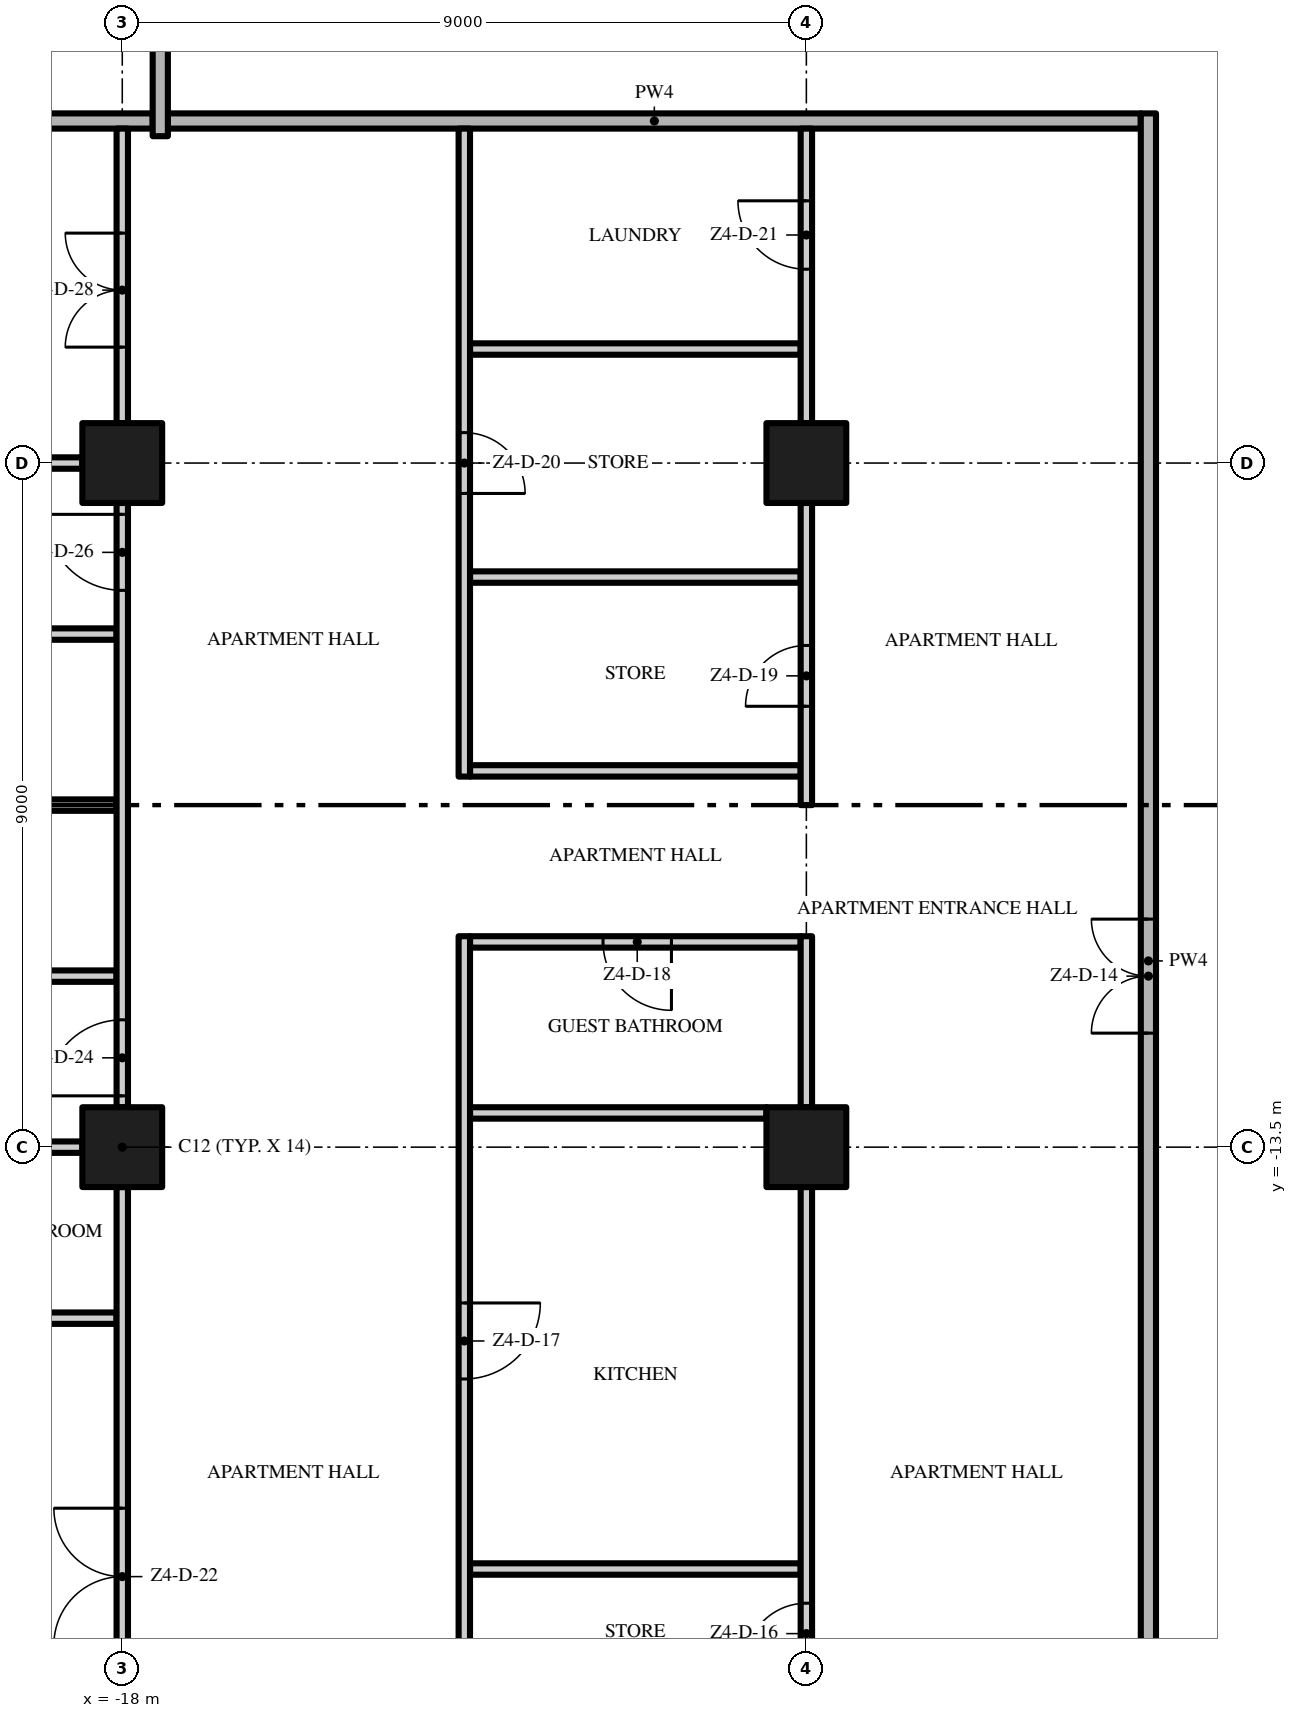
"""IFC4 building model, lengths in metres.
Left out: names, types, materials, properties, quantities, classifications, styles, units other than length and angle.
Written with IfcOpenShell. Run it as: python <this file> out.ifc"""

import sys

from ifc_helpers import new_model, si_unit, direction, frame, frame_2d, origin, origin_2d, place, context, subcontext, project, spatial, rectangle, extrude, element, fill, save


model = new_model("IFC4")
c1 = context("Model", 3, precision=1e-05, world=origin(), true_north=direction((0.0, 1.0)))
c2 = subcontext(c1, "Body", "Model", "MODEL_VIEW")
j1 = project(units=[si_unit("LENGTHUNIT", "METRE"), si_unit("PLANEANGLEUNIT", "RADIAN")], contexts=[c1])
p1 = place(None, origin())
s1 = spatial("IfcSite", under=j1, at=p1, CompositionType="ELEMENT")
p2 = place(p1, origin())
s2 = spatial("IfcBuilding", under=s1, at=p2, CompositionType="ELEMENT")
p3 = place(p2, frame((0.0, 0.0, 218.6)))
s3 = spatial("IfcBuildingStorey", under=s2, at=p3, CompositionType="ELEMENT", Elevation=218.6)
for number, where, z_axis, x_axis in (
    (1, (-18.0, -13.5, 0.0), (0.0, 0.0, 1.0), (1.0, 0.0, 0.0)),
    (2, (-18.0, -4.5, 0.0), (0.0, 0.0, 1.0), (1.0, 0.0, 0.0)),
    (3, (-9.0, -13.5, 0.0), (0.0, 0.0, 1.0), (1.0, 0.0, 0.0)),
    (4, (-9.0, -4.5, 0.0), (0.0, 0.0, 1.0), (1.0, 0.0, 0.0)),
):
    element("IfcColumn", number, at=place(p3, frame(where, z_axis=z_axis, x_axis=x_axis)), inside=s3, PredefinedType="COLUMN", context=c2, shape_type="SweptSolid", body=[
        extrude(rectangle(XDim=1.05, YDim=1.05, at=origin_2d()), origin(), (0.0, 0.0, 1.0), 3.5),
    ])
p4 = place(p3, frame((-13.425, -19.05, 0.0), z_axis=(0.0, 0.0, 1.0), x_axis=(1.0, 0.0, 0.0)))
e5 = element("IfcWall", 5, at=p4, inside=s3, PredefinedType="PARTITIONING", context=c2, shape_type="SweptSolid", body=[
    extrude(rectangle(XDim=4.35, YDim=0.15, at=frame_2d((2.175, 0.0))), origin(), (0.0, 0.0, 1.0), 3.5),
])
p5 = place(p3, frame((-20.925, -15.75, 0.0), z_axis=(0.0, 0.0, 1.0), x_axis=(1.0, 0.0, 0.0)))
e6 = element("IfcWall", 6, at=p5, inside=s3, PredefinedType="PARTITIONING", context=c2, shape_type="SweptSolid", body=[
    extrude(rectangle(XDim=2.85, YDim=0.15, at=frame_2d((1.425, 0.0))), origin(), (0.0, 0.0, 1.0), 3.5),
])
p6 = place(p3, frame((-26.05, -13.5, 0.0), z_axis=(0.0, 0.0, 1.0), x_axis=(1.0, 0.0, 0.0)))
e7 = element("IfcWall", 7, at=p6, inside=s3, PredefinedType="PARTITIONING", context=c2, shape_type="SweptSolid", body=[
    extrude(rectangle(XDim=7.525, YDim=0.15, at=frame_2d((3.763, 0.0))), origin(), (0.0, 0.0, 1.0), 3.5),
])
p7 = place(p3, frame((-13.425, -13.05, 0.0), z_axis=(0.0, 0.0, 1.0), x_axis=(1.0, 0.0, 0.0)))
e8 = element("IfcWall", 8, at=p7, inside=s3, PredefinedType="PARTITIONING", context=c2, shape_type="SweptSolid", body=[
    extrude(rectangle(XDim=3.9, YDim=0.15, at=frame_2d((1.95, 0.0))), origin(), (0.0, 0.0, 1.0), 3.5),
])
p8 = place(p3, frame((-20.925, -11.25, 0.0), z_axis=(0.0, 0.0, 1.0), x_axis=(1.0, 0.0, 0.0)))
e9 = element("IfcWall", 9, at=p8, inside=s3, PredefinedType="PARTITIONING", context=c2, shape_type="SweptSolid", body=[
    extrude(rectangle(XDim=2.85, YDim=0.15, at=frame_2d((1.425, 0.0))), origin(), (0.0, 0.0, 1.0), 3.5),
])
p9 = place(p3, frame((-9.075, -10.8, 0.0), z_axis=(0.0, 0.0, 1.0), x_axis=(-1.0, 0.0, 0.0)))
e10 = element("IfcWall", 10, at=p9, inside=s3, PredefinedType="PARTITIONING", context=c2, shape_type="SweptSolid", body=[
    extrude(rectangle(XDim=4.35, YDim=0.15, at=frame_2d((2.175, 0.0))), origin(), (0.0, 0.0, 1.0), 3.5),
])
p10 = place(p9, frame((1.7, 0.0, 0.0)))
e11 = element("IfcOpeningElement", 11, at=p10, cuts=e10, PredefinedType="OPENING", context=c2, shape_type="SweptSolid", body=[
    extrude(rectangle(XDim=0.9, YDim=2.1, at=frame_2d((0.45, 1.05))), frame((0.0, 0.085, 0.0), z_axis=(0.0, -1.0, 0.0), x_axis=(1.0, 0.0, 0.0)), (0.0, 0.0, 1.0), 0.17),
])
p11 = place(p3, frame((-20.925, -9.0, 0.0), z_axis=(0.0, 0.0, 1.0), x_axis=(1.0, 0.0, 0.0)))
e12 = element("IfcWall", 12, at=p11, inside=s3, PredefinedType="PARTITIONING", context=c2, shape_type="SweptSolid", body=[
    extrude(rectangle(XDim=2.85, YDim=0.15, at=frame_2d((1.425, 0.0))), origin(), (0.0, 0.0, 1.0), 3.5),
])
p12 = place(p3, frame((-13.425, -8.55, 0.0), z_axis=(0.0, 0.0, 1.0), x_axis=(1.0, 0.0, 0.0)))
e13 = element("IfcWall", 13, at=p12, inside=s3, PredefinedType="PARTITIONING", context=c2, shape_type="SweptSolid", body=[
    extrude(rectangle(XDim=4.35, YDim=0.15, at=frame_2d((2.175, 0.0))), origin(), (0.0, 0.0, 1.0), 3.5),
])
p13 = place(p3, frame((-20.925, -6.75, 0.0), z_axis=(0.0, 0.0, 1.0), x_axis=(1.0, 0.0, 0.0)))
e14 = element("IfcWall", 14, at=p13, inside=s3, PredefinedType="PARTITIONING", context=c2, shape_type="SweptSolid", body=[
    extrude(rectangle(XDim=2.85, YDim=0.15, at=frame_2d((1.425, 0.0))), origin(), (0.0, 0.0, 1.0), 3.5),
])
p14 = place(p3, frame((-13.425, -6.0, 0.0), z_axis=(0.0, 0.0, 1.0), x_axis=(1.0, 0.0, 0.0)))
e15 = element("IfcWall", 15, at=p14, inside=s3, PredefinedType="PARTITIONING", context=c2, shape_type="SweptSolid", body=[
    extrude(rectangle(XDim=4.35, YDim=0.15, at=frame_2d((2.175, 0.0))), origin(), (0.0, 0.0, 1.0), 3.5),
])
p15 = place(p3, frame((-26.05, -4.5, 0.0), z_axis=(0.0, 0.0, 1.0), x_axis=(1.0, 0.0, 0.0)))
e16 = element("IfcWall", 16, at=p15, inside=s3, PredefinedType="PARTITIONING", context=c2, shape_type="SweptSolid", body=[
    extrude(rectangle(XDim=7.525, YDim=0.15, at=frame_2d((3.763, 0.0))), origin(), (0.0, 0.0, 1.0), 3.5),
])
p16 = place(p3, frame((-13.425, -3.0, 0.0), z_axis=(0.0, 0.0, 1.0), x_axis=(1.0, 0.0, 0.0)))
e17 = element("IfcWall", 17, at=p16, inside=s3, PredefinedType="PARTITIONING", context=c2, shape_type="SweptSolid", body=[
    extrude(rectangle(XDim=4.35, YDim=0.15, at=frame_2d((2.175, 0.0))), origin(), (0.0, 0.0, 1.0), 3.5),
])
p17 = place(p3, frame((-17.4, 0.0, 0.0), z_axis=(0.0, 0.0, 1.0), x_axis=(1.0, 0.0, 0.0)))
e18 = element("IfcWall", 18, at=p17, inside=s3, PredefinedType="PARTITIONING", context=c2, shape_type="SweptSolid", body=[
    extrude(rectangle(XDim=12.8, YDim=0.2, at=frame_2d((6.4, 0.0))), origin(), (0.0, 0.0, 1.0), 3.5),
])
p18 = place(p3, frame((-26.7, 0.0, 0.0), z_axis=(0.0, 0.0, 1.0), x_axis=(1.0, 0.0, 0.0)))
e19 = element("IfcWall", 19, at=p18, inside=s3, PredefinedType="PARTITIONING", context=c2, shape_type="SweptSolid", body=[
    extrude(rectangle(XDim=9.1, YDim=0.2, at=frame_2d((4.55, 0.0))), origin(), (0.0, 0.0, 1.0), 3.5),
])
p19 = place(p3, frame((-18.0, -21.55, 0.0), z_axis=(0.0, 0.0, 1.0), x_axis=(0.0, 1.0, 0.0)))
e20 = element("IfcWall", 20, at=p19, inside=s3, PredefinedType="PARTITIONING", context=c2, shape_type="SweptSolid", body=[
    extrude(rectangle(XDim=7.525, YDim=0.15, at=frame_2d((3.763, 0.0))), origin(), (0.0, 0.0, 1.0), 3.5),
])
p20 = place(p19, frame((1.5, 0.0, 0.0)))
e21 = element("IfcOpeningElement", 21, at=p20, cuts=e20, PredefinedType="OPENING", context=c2, shape_type="SweptSolid", body=[
    extrude(rectangle(XDim=1.8, YDim=2.4, at=frame_2d((0.9, 1.2))), frame((0.0, 0.085, 0.0), z_axis=(0.0, -1.0, 0.0), x_axis=(1.0, 0.0, 0.0)), (0.0, 0.0, 1.0), 0.17),
])
p21 = place(p3, frame((-18.0, -12.975, 0.0), z_axis=(0.0, 0.0, 1.0), x_axis=(0.0, 1.0, 0.0)))
e22 = element("IfcWall", 22, at=p21, inside=s3, PredefinedType="PARTITIONING", context=c2, shape_type="SweptSolid", body=[
    extrude(rectangle(XDim=7.95, YDim=0.15, at=frame_2d((3.975, 0.0))), origin(), (0.0, 0.0, 1.0), 3.5),
])
p22 = place(p21, frame((0.15, 0.0, 0.0)))
e23 = element("IfcOpeningElement", 23, at=p22, cuts=e22, PredefinedType="OPENING", context=c2, shape_type="SweptSolid", body=[
    extrude(rectangle(XDim=1.0, YDim=2.4, at=frame_2d((0.5, 1.2))), frame((0.0, 0.085, 0.0), z_axis=(0.0, -1.0, 0.0), x_axis=(1.0, 0.0, 0.0)), (0.0, 0.0, 1.0), 0.17),
])
p23 = place(p21, frame((6.8, 0.0, 0.0)))
e24 = element("IfcOpeningElement", 24, at=p23, cuts=e22, PredefinedType="OPENING", context=c2, shape_type="SweptSolid", body=[
    extrude(rectangle(XDim=1.0, YDim=2.4, at=frame_2d((0.5, 1.2))), frame((0.0, 0.085, 0.0), z_axis=(0.0, -1.0, 0.0), x_axis=(1.0, 0.0, 0.0)), (0.0, 0.0, 1.0), 0.17),
])
p24 = place(p3, frame((-18.0, -3.975, 0.0), z_axis=(0.0, 0.0, 1.0), x_axis=(0.0, 1.0, 0.0)))
e25 = element("IfcWall", 25, at=p24, inside=s3, PredefinedType="PARTITIONING", context=c2, shape_type="SweptSolid", body=[
    extrude(rectangle(XDim=3.875, YDim=0.15, at=frame_2d((1.938, 0.0))), origin(), (0.0, 0.0, 1.0), 3.5),
])
p25 = place(p24, frame((1.0, 0.0, 0.0)))
e26 = element("IfcOpeningElement", 26, at=p25, cuts=e25, PredefinedType="OPENING", context=c2, shape_type="SweptSolid", body=[
    extrude(rectangle(XDim=1.5, YDim=2.4, at=frame_2d((0.75, 1.2))), frame((0.0, 0.085, 0.0), z_axis=(0.0, -1.0, 0.0), x_axis=(1.0, 0.0, 0.0)), (0.0, 0.0, 1.0), 0.17),
])
p26 = place(p3, frame((-17.5, -0.2, 0.0), z_axis=(0.0, 0.0, 1.0), x_axis=(0.0, 1.0, 0.0)))
e27 = element("IfcWall", 27, at=p26, inside=s3, PredefinedType="PARTITIONING", context=c2, shape_type="SweptSolid", body=[
    extrude(rectangle(XDim=4.175, YDim=0.2, at=frame_2d((2.087, 0.0))), origin(), (0.0, 0.0, 1.0), 3.5),
])
p27 = place(p3, frame((-13.5, -10.725, 0.0), z_axis=(0.0, 0.0, 1.0), x_axis=(0.0, -1.0, 0.0)))
e28 = element("IfcWall", 28, at=p27, inside=s3, PredefinedType="PARTITIONING", context=c2, shape_type="SweptSolid", body=[
    extrude(rectangle(XDim=11.475, YDim=0.15, at=frame_2d((5.737, 0.0))), origin(), (0.0, 0.0, 1.0), 3.5),
])
p28 = place(p27, frame((10.475, 0.0, 0.0)))
e29 = element("IfcOpeningElement", 29, at=p28, cuts=e28, PredefinedType="OPENING", context=c2, shape_type="SweptSolid", body=[
    extrude(rectangle(XDim=0.8, YDim=2.0, at=frame_2d((0.4, 1.0))), frame((0.0, 0.085, 0.0), z_axis=(0.0, -1.0, 0.0), x_axis=(1.0, 0.0, 0.0)), (0.0, 0.0, 1.0), 0.17),
])
p29 = place(p27, frame((4.825, 0.0, 0.0)))
e30 = element("IfcOpeningElement", 30, at=p29, cuts=e28, PredefinedType="OPENING", context=c2, shape_type="SweptSolid", body=[
    extrude(rectangle(XDim=1.0, YDim=2.4, at=frame_2d((0.5, 1.2))), frame((0.0, 0.085, 0.0), z_axis=(0.0, -1.0, 0.0), x_axis=(1.0, 0.0, 0.0)), (0.0, 0.0, 1.0), 0.17),
])
p30 = place(p3, frame((-13.5, -0.1, 0.0), z_axis=(0.0, 0.0, 1.0), x_axis=(0.0, -1.0, 0.0)))
e31 = element("IfcWall", 31, at=p30, inside=s3, PredefinedType="PARTITIONING", context=c2, shape_type="SweptSolid", body=[
    extrude(rectangle(XDim=8.525, YDim=0.15, at=frame_2d((4.263, 0.0))), origin(), (0.0, 0.0, 1.0), 3.5),
])
p31 = place(p30, frame((4.0, 0.0, 0.0)))
e32 = element("IfcOpeningElement", 32, at=p31, cuts=e31, PredefinedType="OPENING", context=c2, shape_type="SweptSolid", body=[
    extrude(rectangle(XDim=0.8, YDim=2.0, at=frame_2d((0.4, 1.0))), frame((0.0, 0.085, 0.0), z_axis=(0.0, -1.0, 0.0), x_axis=(1.0, 0.0, 0.0)), (0.0, 0.0, 1.0), 0.17),
])
p32 = place(p3, frame((-9.0, -21.55, 0.0), z_axis=(0.0, 0.0, 1.0), x_axis=(0.0, 1.0, 0.0)))
e33 = element("IfcWall", 33, at=p32, inside=s3, PredefinedType="PARTITIONING", context=c2, shape_type="SweptSolid", body=[
    extrude(rectangle(XDim=7.525, YDim=0.15, at=frame_2d((3.763, 0.0))), origin(), (0.0, 0.0, 1.0), 3.5),
])
p33 = place(p32, frame((1.25, 0.0, 0.0)))
e34 = element("IfcOpeningElement", 34, at=p33, cuts=e33, PredefinedType="OPENING", context=c2, shape_type="SweptSolid", body=[
    extrude(rectangle(XDim=0.8, YDim=2.0, at=frame_2d((0.4, 1.0))), frame((0.0, 0.085, 0.0), z_axis=(0.0, -1.0, 0.0), x_axis=(1.0, 0.0, 0.0)), (0.0, 0.0, 1.0), 0.17),
])
p34 = place(p3, frame((-9.0, -12.975, 0.0), z_axis=(0.0, 0.0, 1.0), x_axis=(0.0, 1.0, 0.0)))
e35 = element("IfcWall", 35, at=p34, inside=s3, PredefinedType="PARTITIONING", context=c2, shape_type="SweptSolid", body=[
    extrude(rectangle(XDim=2.25, YDim=0.15, at=frame_2d((1.125, 0.0))), origin(), (0.0, 0.0, 1.0), 3.5),
])
p35 = place(p3, frame((-9.0, -9.0, 0.0), z_axis=(0.0, 0.0, 1.0), x_axis=(0.0, 1.0, 0.0)))
e36 = element("IfcWall", 36, at=p35, inside=s3, PredefinedType="PARTITIONING", context=c2, shape_type="SweptSolid", body=[
    extrude(rectangle(XDim=3.975, YDim=0.15, at=frame_2d((1.988, 0.0))), origin(), (0.0, 0.0, 1.0), 3.5),
])
p36 = place(p35, frame((1.3, 0.0, 0.0)))
e37 = element("IfcOpeningElement", 37, at=p36, cuts=e36, PredefinedType="OPENING", context=c2, shape_type="SweptSolid", body=[
    extrude(rectangle(XDim=0.8, YDim=2.0, at=frame_2d((0.4, 1.0))), frame((0.0, 0.085, 0.0), z_axis=(0.0, -1.0, 0.0), x_axis=(1.0, 0.0, 0.0)), (0.0, 0.0, 1.0), 0.17),
])
p37 = place(p3, frame((-9.0, -3.975, 0.0), z_axis=(0.0, 0.0, 1.0), x_axis=(0.0, 1.0, 0.0)))
e38 = element("IfcWall", 38, at=p37, inside=s3, PredefinedType="PARTITIONING", context=c2, shape_type="SweptSolid", body=[
    extrude(rectangle(XDim=3.875, YDim=0.15, at=frame_2d((1.938, 0.0))), origin(), (0.0, 0.0, 1.0), 3.5),
])
p38 = place(p37, frame((2.025, 0.0, 0.0)))
e39 = element("IfcOpeningElement", 39, at=p38, cuts=e38, PredefinedType="OPENING", context=c2, shape_type="SweptSolid", body=[
    extrude(rectangle(XDim=0.9, YDim=2.1, at=frame_2d((0.45, 1.05))), frame((0.0, 0.085, 0.0), z_axis=(0.0, -1.0, 0.0), x_axis=(1.0, 0.0, 0.0)), (0.0, 0.0, 1.0), 0.17),
])
p39 = place(p3, frame((-4.5, -22.2, 0.0), z_axis=(0.0, 0.0, 1.0), x_axis=(0.0, 1.0, 0.0)))
e40 = element("IfcWall", 40, at=p39, inside=s3, PredefinedType="PARTITIONING", context=c2, shape_type="SweptSolid", body=[
    extrude(rectangle(XDim=22.3, YDim=0.2, at=frame_2d((11.15, 0.0))), origin(), (0.0, 0.0, 1.0), 3.5),
])
p40 = place(p39, frame((10.2, 0.0, 0.0)))
e41 = element("IfcOpeningElement", 41, at=p40, cuts=e40, PredefinedType="OPENING", context=c2, shape_type="SweptSolid", body=[
    extrude(rectangle(XDim=1.5, YDim=2.4, at=frame_2d((0.75, 1.2))), frame((0.0, 0.11, 0.0), z_axis=(0.0, -1.0, 0.0), x_axis=(1.0, 0.0, 0.0)), (0.0, 0.0, 1.0), 0.22),
])
p41 = place(p40, origin())
e42 = element("IfcDoor", 42, at=p41, inside=s3, OperationType="DOUBLE_DOOR_SINGLE_SWING", PredefinedType="DOOR", context=c2, shape_type="SweptSolid", body=[
    extrude(rectangle(XDim=1.5, YDim=2.4, at=frame_2d((0.75, 1.2))), frame((0.0, 0.025, 0.0), z_axis=(0.0, -1.0, 0.0), x_axis=(1.0, 0.0, 0.0)), (0.0, 0.0, 1.0), 0.05),
])
fill(e41, e42)
p42 = place(p33, origin())
e43 = element("IfcDoor", 43, at=p42, inside=s3, OperationType="SINGLE_SWING_LEFT", PredefinedType="DOOR", context=c2, shape_type="SweptSolid", body=[
    extrude(rectangle(XDim=0.8, YDim=2.0, at=frame_2d((0.4, 1.0))), frame((0.0, 0.025, 0.0), z_axis=(0.0, -1.0, 0.0), x_axis=(1.0, 0.0, 0.0)), (0.0, 0.0, 1.0), 0.05),
])
fill(e34, e43)
p43 = place(p29, origin())
e44 = element("IfcDoor", 44, at=p43, inside=s3, OperationType="SINGLE_SWING_LEFT", PredefinedType="DOOR", context=c2, shape_type="SweptSolid", body=[
    extrude(rectangle(XDim=1.0, YDim=2.4, at=frame_2d((0.5, 1.2))), frame((0.0, 0.025, 0.0), z_axis=(0.0, -1.0, 0.0), x_axis=(1.0, 0.0, 0.0)), (0.0, 0.0, 1.0), 0.05),
])
fill(e30, e44)
p44 = place(p10, origin())
e45 = element("IfcDoor", 45, at=p44, inside=s3, OperationType="SINGLE_SWING_LEFT", PredefinedType="DOOR", context=c2, shape_type="SweptSolid", body=[
    extrude(rectangle(XDim=0.9, YDim=2.1, at=frame_2d((0.45, 1.05))), frame((0.0, 0.025, 0.0), z_axis=(0.0, -1.0, 0.0), x_axis=(1.0, 0.0, 0.0)), (0.0, 0.0, 1.0), 0.05),
])
fill(e11, e45)
p45 = place(p36, origin())
e46 = element("IfcDoor", 46, at=p45, inside=s3, OperationType="SINGLE_SWING_LEFT", PredefinedType="DOOR", context=c2, shape_type="SweptSolid", body=[
    extrude(rectangle(XDim=0.8, YDim=2.0, at=frame_2d((0.4, 1.0))), frame((0.0, 0.025, 0.0), z_axis=(0.0, -1.0, 0.0), x_axis=(1.0, 0.0, 0.0)), (0.0, 0.0, 1.0), 0.05),
])
fill(e37, e46)
p46 = place(p31, origin())
e47 = element("IfcDoor", 47, at=p46, inside=s3, OperationType="SINGLE_SWING_RIGHT", PredefinedType="DOOR", context=c2, shape_type="SweptSolid", body=[
    extrude(rectangle(XDim=0.8, YDim=2.0, at=frame_2d((0.4, 1.0))), frame((0.0, 0.025, 0.0), z_axis=(0.0, -1.0, 0.0), x_axis=(1.0, 0.0, 0.0)), (0.0, 0.0, 1.0), 0.05),
])
fill(e32, e47)
p47 = place(p38, origin())
e48 = element("IfcDoor", 48, at=p47, inside=s3, OperationType="SINGLE_SWING_RIGHT", PredefinedType="DOOR", context=c2, shape_type="SweptSolid", body=[
    extrude(rectangle(XDim=0.9, YDim=2.1, at=frame_2d((0.45, 1.05))), frame((0.0, 0.025, 0.0), z_axis=(0.0, -1.0, 0.0), x_axis=(1.0, 0.0, 0.0)), (0.0, 0.0, 1.0), 0.05),
])
fill(e39, e48)
p48 = place(p20, origin())
e49 = element("IfcDoor", 49, at=p48, inside=s3, OperationType="DOUBLE_DOOR_SINGLE_SWING", PredefinedType="DOOR", context=c2, shape_type="SweptSolid", body=[
    extrude(rectangle(XDim=1.8, YDim=2.4, at=frame_2d((0.9, 1.2))), frame((0.0, 0.025, 0.0), z_axis=(0.0, -1.0, 0.0), x_axis=(1.0, 0.0, 0.0)), (0.0, 0.0, 1.0), 0.05),
])
fill(e21, e49)
p49 = place(p22, origin())
e50 = element("IfcDoor", 50, at=p49, inside=s3, OperationType="SINGLE_SWING_LEFT", PredefinedType="DOOR", context=c2, shape_type="SweptSolid", body=[
    extrude(rectangle(XDim=1.0, YDim=2.4, at=frame_2d((0.5, 1.2))), frame((0.0, 0.025, 0.0), z_axis=(0.0, -1.0, 0.0), x_axis=(1.0, 0.0, 0.0)), (0.0, 0.0, 1.0), 0.05),
])
fill(e23, e50)
p50 = place(p23, origin())
e51 = element("IfcDoor", 51, at=p50, inside=s3, OperationType="SINGLE_SWING_RIGHT", PredefinedType="DOOR", context=c2, shape_type="SweptSolid", body=[
    extrude(rectangle(XDim=1.0, YDim=2.4, at=frame_2d((0.5, 1.2))), frame((0.0, 0.025, 0.0), z_axis=(0.0, -1.0, 0.0), x_axis=(1.0, 0.0, 0.0)), (0.0, 0.0, 1.0), 0.05),
])
fill(e24, e51)
p51 = place(p25, origin())
e52 = element("IfcDoor", 52, at=p51, inside=s3, OperationType="DOUBLE_DOOR_SINGLE_SWING", PredefinedType="DOOR", context=c2, shape_type="SweptSolid", body=[
    extrude(rectangle(XDim=1.5, YDim=2.4, at=frame_2d((0.75, 1.2))), frame((0.0, 0.025, 0.0), z_axis=(0.0, -1.0, 0.0), x_axis=(1.0, 0.0, 0.0)), (0.0, 0.0, 1.0), 0.05),
])
fill(e26, e52)
save(model, sys.argv[1])
